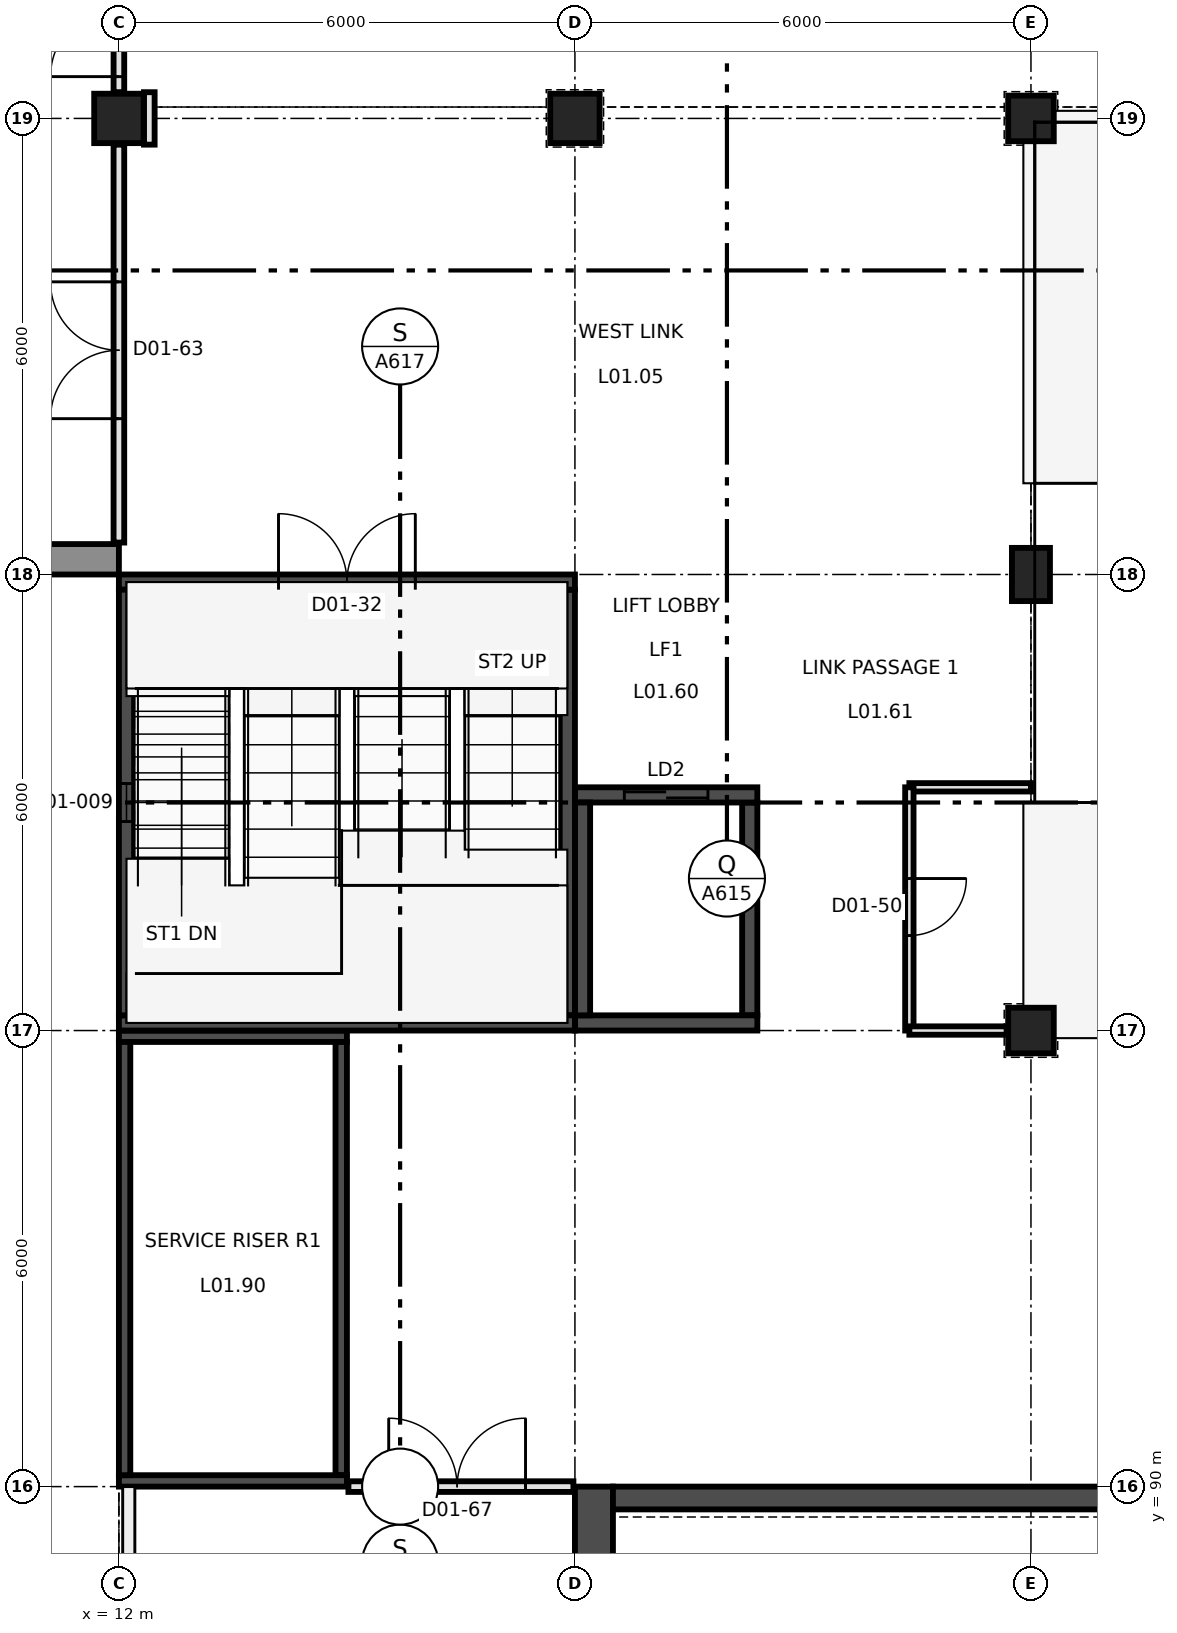
"""IFC4 building model, lengths in metres.
Left out: names, types, materials, properties, quantities, classifications, styles, units other than length and angle.
Written with IfcOpenShell. Run it as: python <this file> out.ifc"""

import sys

from ifc_helpers import new_model, si_unit, direction, frame, frame_2d, origin, origin_2d, place, context, subcontext, project, spatial, rectangle, extrude, element, fill, save


model = new_model("IFC4")
c1 = context("Model", 3, precision=1e-05, world=origin(), true_north=direction((0.0, 1.0)))
c2 = subcontext(c1, "Body", "Model", "MODEL_VIEW")
j1 = project(units=[si_unit("LENGTHUNIT", "METRE"), si_unit("PLANEANGLEUNIT", "RADIAN")], contexts=[c1])
p1 = place(None, origin())
s1 = spatial("IfcSite", under=j1, at=p1, CompositionType="ELEMENT")
p2 = place(p1, origin())
s2 = spatial("IfcBuilding", under=s1, at=p2, CompositionType="ELEMENT")
p3 = place(p2, frame((0.0, 0.0, 7.0)))
s3 = spatial("IfcBuildingStorey", under=s2, at=p3, CompositionType="ELEMENT", Elevation=7.0)
p4 = place(p3, frame((24.0, 96.0, 0.0), z_axis=(0.0, 0.0, 1.0), x_axis=(1.0, 0.0, 0.0)))
e1 = element("IfcColumn", 1, at=p4, inside=s3, PredefinedType="COLUMN", context=c2, shape_type="SweptSolid", body=[
    extrude(rectangle(XDim=0.6, YDim=0.6, at=origin_2d()), origin(), (0.0, 0.0, 1.0), 5.0),
])
p5 = place(p3, frame((24.0, 102.0, 0.0), z_axis=(0.0, 0.0, 1.0), x_axis=(1.0, 0.0, 0.0)))
e2 = element("IfcColumn", 2, at=p5, inside=s3, PredefinedType="COLUMN", context=c2, shape_type="SweptSolid", body=[
    extrude(rectangle(XDim=0.5, YDim=0.7, at=origin_2d()), origin(), (0.0, 0.0, 1.0), 5.0),
])
for number, where, z_axis, x_axis in (
    (3, (12.0, 108.0, 0.0), (0.0, 0.0, 1.0), (1.0, 0.0, 0.0)),
    (4, (18.0, 108.0, 0.0), (0.0, 0.0, 1.0), (1.0, 0.0, 0.0)),
):
    element("IfcColumn", number, at=place(p3, frame(where, z_axis=z_axis, x_axis=x_axis)), inside=s3, PredefinedType="COLUMN", context=c2, shape_type="SweptSolid", body=[
        extrude(rectangle(XDim=0.65, YDim=0.65, at=origin_2d()), origin(), (0.0, 0.0, 1.0), 5.0),
    ])
p6 = place(p3, frame((24.0, 108.0, 0.0), z_axis=(0.0, 0.0, 1.0), x_axis=(1.0, 0.0, 0.0)))
e5 = element("IfcColumn", 5, at=p6, inside=s3, PredefinedType="COLUMN", context=c2, shape_type="SweptSolid", body=[
    extrude(rectangle(XDim=0.6, YDim=0.6, at=origin_2d()), origin(), (0.0, 0.0, 1.0), 5.0),
])
p7 = place(p3, frame((12.0, 101.9, 0.0), z_axis=(0.0, 0.0, 1.0), x_axis=(1.0, 0.0, 0.0)))
e6 = element("IfcWall", 6, at=p7, inside=s3, PredefinedType="SHEAR", context=c2, shape_type="SweptSolid", body=[
    extrude(rectangle(XDim=6.0, YDim=0.2, at=frame_2d((3.0, 0.0))), origin(), (0.0, 0.0, 1.0), 5.0),
])
p8 = place(p7, frame((2.1, 0.0, 0.0)))
e7 = element("IfcOpeningElement", 7, at=p8, cuts=e6, PredefinedType="OPENING", context=c2, shape_type="SweptSolid", body=[
    extrude(rectangle(XDim=1.8, YDim=2.2, at=frame_2d((0.9, 1.1))), frame((0.0, 0.11, 0.0), z_axis=(0.0, -1.0, 0.0), x_axis=(1.0, 0.0, 0.0)), (0.0, 0.0, 1.0), 0.22),
])
p9 = place(p3, frame((12.0, 96.1, 0.0), z_axis=(0.0, 0.0, 1.0), x_axis=(1.0, 0.0, 0.0)))
e8 = element("IfcWall", 8, at=p9, inside=s3, PredefinedType="SHEAR", context=c2, shape_type="SweptSolid", body=[
    extrude(rectangle(XDim=6.0, YDim=0.2, at=frame_2d((3.0, 0.0))), origin(), (0.0, 0.0, 1.0), 5.0),
])
p10 = place(p3, frame((12.1, 96.2, 0.0), z_axis=(0.0, 0.0, 1.0), x_axis=(0.0, 1.0, 0.0)))
e9 = element("IfcWall", 9, at=p10, inside=s3, PredefinedType="SHEAR", context=c2, shape_type="SweptSolid", body=[
    extrude(rectangle(XDim=5.6, YDim=0.2, at=frame_2d((2.8, 0.0))), origin(), (0.0, 0.0, 1.0), 5.0),
])
p11 = place(p10, frame((2.55, 0.0, 0.9)))
e10 = element("IfcOpeningElement", 10, at=p11, cuts=e9, PredefinedType="OPENING", context=c2, shape_type="SweptSolid", body=[
    extrude(rectangle(XDim=0.5, YDim=2.1, at=frame_2d((0.25, 1.05))), frame((0.0, 0.11, 0.0), z_axis=(0.0, -1.0, 0.0), x_axis=(1.0, 0.0, 0.0)), (0.0, 0.0, 1.0), 0.22),
])
p12 = place(p3, frame((17.9, 96.2, 0.0), z_axis=(0.0, 0.0, 1.0), x_axis=(0.0, 1.0, 0.0)))
e11 = element("IfcWall", 11, at=p12, inside=s3, PredefinedType="SHEAR", context=c2, shape_type="SweptSolid", body=[
    extrude(rectangle(XDim=5.6, YDim=0.2, at=frame_2d((2.8, 0.0))), origin(), (0.0, 0.0, 1.0), 5.0),
])
p13 = place(p3, frame((18.0, 99.1, 0.0), z_axis=(0.0, 0.0, 1.0), x_axis=(1.0, 0.0, 0.0)))
e12 = element("IfcWall", 12, at=p13, inside=s3, PredefinedType="SHEAR", context=c2, shape_type="SweptSolid", body=[
    extrude(rectangle(XDim=2.4, YDim=0.2, at=frame_2d((1.2, 0.0))), origin(), (0.0, 0.0, 1.0), 5.0),
])
p14 = place(p13, frame((0.65, 0.0, 0.0)))
e13 = element("IfcOpeningElement", 13, at=p14, cuts=e12, PredefinedType="OPENING", context=c2, shape_type="SweptSolid", body=[
    extrude(rectangle(XDim=1.1, YDim=2.1, at=frame_2d((0.55, 1.05))), frame((0.0, 0.11, 0.0), z_axis=(0.0, -1.0, 0.0), x_axis=(1.0, 0.0, 0.0)), (0.0, 0.0, 1.0), 0.22),
])
p15 = place(p3, frame((18.0, 96.1, 0.0), z_axis=(0.0, 0.0, 1.0), x_axis=(1.0, 0.0, 0.0)))
e14 = element("IfcWall", 14, at=p15, inside=s3, PredefinedType="SHEAR", context=c2, shape_type="SweptSolid", body=[
    extrude(rectangle(XDim=2.4, YDim=0.2, at=frame_2d((1.2, 0.0))), origin(), (0.0, 0.0, 1.0), 5.0),
])
for number, where, z_axis, x_axis in (
    (15, (18.1, 96.2, 0.0), (0.0, 0.0, 1.0), (0.0, 1.0, 0.0)),
    (16, (20.3, 96.2, 0.0), (0.0, 0.0, 1.0), (0.0, 1.0, 0.0)),
):
    element("IfcWall", number, at=place(p3, frame(where, z_axis=z_axis, x_axis=x_axis)), inside=s3, PredefinedType="SHEAR", context=c2, shape_type="SweptSolid", body=[
        extrude(rectangle(XDim=2.8, YDim=0.2, at=frame_2d((1.4, 0.0))), origin(), (0.0, 0.0, 1.0), 5.0),
    ])
for number, where, z_axis, x_axis in (
    (17, (12.0, 95.925, 0.0), (0.0, 0.0, 1.0), (1.0, 0.0, 0.0)),
    (18, (12.0, 90.075, 0.0), (0.0, 0.0, 1.0), (1.0, 0.0, 0.0)),
):
    element("IfcWall", number, at=place(p3, frame(where, z_axis=z_axis, x_axis=x_axis)), inside=s3, PredefinedType="SHEAR", context=c2, shape_type="SweptSolid", body=[
        extrude(rectangle(XDim=3.0, YDim=0.15, at=frame_2d((1.5, 0.0))), origin(), (0.0, 0.0, 1.0), 5.0),
    ])
for number, where, z_axis, x_axis in (
    (19, (12.075, 90.15, 0.0), (0.0, 0.0, 1.0), (0.0, 1.0, 0.0)),
    (20, (14.925, 90.15, 0.0), (0.0, 0.0, 1.0), (0.0, 1.0, 0.0)),
):
    element("IfcWall", number, at=place(p3, frame(where, z_axis=z_axis, x_axis=x_axis)), inside=s3, PredefinedType="SHEAR", context=c2, shape_type="SweptSolid", body=[
        extrude(rectangle(XDim=5.7, YDim=0.15, at=frame_2d((2.85, 0.0))), origin(), (0.0, 0.0, 1.0), 5.0),
    ])
p16 = place(p3, frame((18.25, 54.5, 0.0), z_axis=(0.0, 0.0, 1.0), x_axis=(0.0, 1.0, 0.0)))
e21 = element("IfcWall", 21, at=p16, inside=s3, PredefinedType="SHEAR", context=c2, shape_type="SweptSolid", body=[
    extrude(rectangle(XDim=35.5, YDim=0.5, at=frame_2d((17.75, 0.0))), origin(), (0.0, 0.0, 1.0), 5.0),
])
p17 = place(p16, frame((18.2, 0.0, 0.0)))
e22 = element("IfcOpeningElement", 22, at=p17, cuts=e21, PredefinedType="OPENING", context=c2, shape_type="SweptSolid", body=[
    extrude(rectangle(XDim=1.8, YDim=2.4, at=frame_2d((0.9, 1.2))), frame((0.0, 0.26, 0.0), z_axis=(0.0, -1.0, 0.0), x_axis=(1.0, 0.0, 0.0)), (0.0, 0.0, 1.0), 0.52),
])
p18 = place(p16, frame((21.0, 0.0, 0.0)))
e23 = element("IfcOpeningElement", 23, at=p18, cuts=e21, PredefinedType="OPENING", context=c2, shape_type="SweptSolid", body=[
    extrude(rectangle(XDim=1.8, YDim=2.4, at=frame_2d((0.9, 1.2))), frame((0.0, 0.26, 0.0), z_axis=(0.0, -1.0, 0.0), x_axis=(1.0, 0.0, 0.0)), (0.0, 0.0, 1.0), 0.52),
])
p19 = place(p3, frame((18.5, 89.85, 0.0), z_axis=(0.0, 0.0, 1.0), x_axis=(1.0, 0.0, 0.0)))
e24 = element("IfcWall", 24, at=p19, inside=s3, PredefinedType="SHEAR", context=c2, shape_type="SweptSolid", body=[
    extrude(rectangle(XDim=29.0, YDim=0.3, at=frame_2d((14.5, 0.0))), origin(), (0.0, 0.0, 1.0), 5.0),
])
p20 = place(p3, frame((12.0, 102.2, 0.0), z_axis=(0.0, 0.0, 1.0), x_axis=(-1.0, 0.0, 0.0)))
e25 = element("IfcWall", 25, at=p20, inside=s3, PredefinedType="SOLIDWALL", context=c2, shape_type="SweptSolid", body=[
    extrude(rectangle(XDim=5.65, YDim=0.4, at=frame_2d((2.825, 0.0))), origin(), (0.0, 0.0, 1.0), 4.05),
])
p21 = place(p20, frame((1.625, 0.0, 0.9)))
e26 = element("IfcOpeningElement", 26, at=p21, cuts=e25, PredefinedType="OPENING", context=c2, shape_type="SweptSolid", body=[
    extrude(rectangle(XDim=2.4, YDim=2.95, at=frame_2d((1.2, 1.475))), frame((0.0, 0.21, 0.0), z_axis=(0.0, -1.0, 0.0), x_axis=(1.0, 0.0, 0.0)), (0.0, 0.0, 1.0), 0.42),
])
p22 = place(p3, frame((22.4, 99.2, 0.0), z_axis=(0.0, 0.0, 1.0), x_axis=(1.0, 0.0, 0.0)))
e27 = element("IfcWall", 27, at=p22, inside=s3, PredefinedType="PARTITIONING", context=c2, shape_type="SweptSolid", body=[
    extrude(rectangle(XDim=1.6, YDim=0.11, at=frame_2d((0.8, 0.0))), origin(), (0.0, 0.0, 1.0), 4.1),
])
p23 = place(p3, frame((22.4, 96.0, 0.0), z_axis=(0.0, 0.0, 1.0), x_axis=(0.0, 1.0, 0.0)))
e28 = element("IfcWall", 28, at=p23, inside=s3, PredefinedType="PARTITIONING", context=c2, shape_type="SweptSolid", body=[
    extrude(rectangle(XDim=3.2, YDim=0.11, at=frame_2d((1.6, 0.0))), origin(), (0.0, 0.0, 1.0), 4.15),
])
p24 = place(p23, frame((1.25, 0.0, 0.0)))
e29 = element("IfcOpeningElement", 29, at=p24, cuts=e28, PredefinedType="OPENING", context=c2, shape_type="SweptSolid", body=[
    extrude(rectangle(XDim=0.75, YDim=2.04, at=frame_2d((0.375, 1.02))), frame((0.0, 0.065, 0.0), z_axis=(0.0, -1.0, 0.0), x_axis=(1.0, 0.0, 0.0)), (0.0, 0.0, 1.0), 0.13),
])
p25 = place(p3, frame((22.4, 96.0, 0.0), z_axis=(0.0, 0.0, 1.0), x_axis=(1.0, 0.0, 0.0)))
e30 = element("IfcWall", 30, at=p25, inside=s3, PredefinedType="PARTITIONING", context=c2, shape_type="SweptSolid", body=[
    extrude(rectangle(XDim=1.28, YDim=0.11, at=frame_2d((0.64, 0.0))), origin(), (0.0, 0.0, 1.0), 4.15),
])
p26 = place(p3, frame((12.0, 108.345, 0.0), z_axis=(0.0, 0.0, 1.0), x_axis=(0.0, 1.0, 0.0)))
e31 = element("IfcWall", 31, at=p26, inside=s3, PredefinedType="PARTITIONING", context=c2, shape_type="SweptSolid", body=[
    extrude(rectangle(XDim=5.31, YDim=0.14, at=frame_2d((2.655, 0.0))), origin(), (0.0, 0.0, 1.0), 4.05),
])
p27 = place(p26, frame((0.205, 0.0, 0.0)))
e32 = element("IfcOpeningElement", 32, at=p27, cuts=e31, PredefinedType="OPENING", context=c2, shape_type="SweptSolid", body=[
    extrude(rectangle(XDim=1.8, YDim=2.1, at=frame_2d((0.9, 1.05))), frame((0.0, 0.08, 0.0), z_axis=(0.0, -1.0, 0.0), x_axis=(1.0, 0.0, 0.0)), (0.0, 0.0, 1.0), 0.16),
])
p28 = place(p3, frame((12.0, 102.42, 0.0), z_axis=(0.0, 0.0, 1.0), x_axis=(0.0, 1.0, 0.0)))
e33 = element("IfcWall", 33, at=p28, inside=s3, PredefinedType="PARTITIONING", context=c2, shape_type="SweptSolid", body=[
    extrude(rectangle(XDim=5.235, YDim=0.14, at=frame_2d((2.618, 0.0))), origin(), (0.0, 0.0, 1.0), 4.15),
])
p29 = place(p28, frame((1.63, 0.0, 0.0)))
e34 = element("IfcOpeningElement", 34, at=p29, cuts=e33, PredefinedType="OPENING", context=c2, shape_type="SweptSolid", body=[
    extrude(rectangle(XDim=1.8, YDim=2.1, at=frame_2d((0.9, 1.05))), frame((0.0, 0.08, 0.0), z_axis=(0.0, -1.0, 0.0), x_axis=(1.0, 0.0, 0.0)), (0.0, 0.0, 1.0), 0.16),
])
p30 = place(p3, frame((12.4, 107.655, 0.0), z_axis=(0.0, 0.0, 1.0), x_axis=(0.0, 1.0, 0.0)))
e35 = element("IfcWall", 35, at=p30, inside=s3, PredefinedType="PARTITIONING", context=c2, shape_type="SweptSolid", body=[
    extrude(rectangle(XDim=0.69, YDim=0.14, at=frame_2d((0.345, 0.0))), origin(), (0.0, 0.0, 1.0), 4.05),
])
p31 = place(p3, frame((15.02, 90.0, 0.0), z_axis=(0.0, 0.0, 1.0), x_axis=(1.0, 0.0, 0.0)))
e36 = element("IfcWall", 36, at=p31, inside=s3, PredefinedType="PARTITIONING", context=c2, shape_type="SweptSolid", body=[
    extrude(rectangle(XDim=2.96, YDim=0.14, at=frame_2d((1.48, 0.0))), origin(), (0.0, 0.0, 1.0), 4.15),
])
p32 = place(p31, frame((0.53, 0.0, 0.0)))
e37 = element("IfcOpeningElement", 37, at=p32, cuts=e36, PredefinedType="OPENING", context=c2, shape_type="SweptSolid", body=[
    extrude(rectangle(XDim=1.8, YDim=2.1, at=frame_2d((0.9, 1.05))), frame((0.0, 0.08, 0.0), z_axis=(0.0, -1.0, 0.0), x_axis=(1.0, 0.0, 0.0)), (0.0, 0.0, 1.0), 0.16),
])
p33 = place(p11, origin())
e38 = element("IfcWindow", 38, at=p33, inside=s3, PartitioningType="SINGLE_PANEL", PredefinedType="WINDOW", context=c2, shape_type="SweptSolid", body=[
    extrude(rectangle(XDim=0.5, YDim=2.1, at=frame_2d((0.25, 1.05))), frame((0.0, 0.03, 0.0), z_axis=(0.0, -1.0, 0.0), x_axis=(1.0, 0.0, 0.0)), (0.0, 0.0, 1.0), 0.06),
])
fill(e10, e38)
p34 = place(p8, frame((1.8, 0.0, 0.0), z_axis=(0.0, 0.0, 1.0), x_axis=(-1.0, 0.0, 0.0)))
e39 = element("IfcDoor", 39, at=p34, inside=s3, OperationType="DOUBLE_DOOR_SINGLE_SWING", PredefinedType="DOOR", context=c2, shape_type="SweptSolid", body=[
    extrude(rectangle(XDim=1.8, YDim=2.2, at=frame_2d((0.9, 1.1))), frame((0.0, 0.025, 0.0), z_axis=(0.0, -1.0, 0.0), x_axis=(1.0, 0.0, 0.0)), (0.0, 0.0, 1.0), 0.05),
])
fill(e7, e39)
p35 = place(p24, frame((0.75, 0.0, 0.0), z_axis=(0.0, 0.0, 1.0), x_axis=(-1.0, 0.0, 0.0)))
e40 = element("IfcDoor", 40, at=p35, inside=s3, OperationType="SINGLE_SWING_RIGHT", PredefinedType="DOOR", context=c2, shape_type="SweptSolid", body=[
    extrude(rectangle(XDim=0.75, YDim=2.04, at=frame_2d((0.375, 1.02))), frame((0.0, 0.025, 0.0), z_axis=(0.0, -1.0, 0.0), x_axis=(1.0, 0.0, 0.0)), (0.0, 0.0, 1.0), 0.05),
])
fill(e29, e40)
p36 = place(p29, frame((1.8, 0.0, 0.0), z_axis=(0.0, 0.0, 1.0), x_axis=(-1.0, 0.0, 0.0)))
e41 = element("IfcDoor", 41, at=p36, inside=s3, OperationType="DOUBLE_DOOR_SINGLE_SWING", PredefinedType="DOOR", context=c2, shape_type="SweptSolid", body=[
    extrude(rectangle(XDim=1.8, YDim=2.1, at=frame_2d((0.9, 1.05))), frame((0.0, 0.025, 0.0), z_axis=(0.0, -1.0, 0.0), x_axis=(1.0, 0.0, 0.0)), (0.0, 0.0, 1.0), 0.05),
])
fill(e34, e41)
p37 = place(p27, frame((1.8, 0.0, 0.0), z_axis=(0.0, 0.0, 1.0), x_axis=(-1.0, 0.0, 0.0)))
e42 = element("IfcDoor", 42, at=p37, inside=s3, OperationType="DOUBLE_DOOR_SINGLE_SWING", PredefinedType="DOOR", context=c2, shape_type="SweptSolid", body=[
    extrude(rectangle(XDim=1.8, YDim=2.1, at=frame_2d((0.9, 1.05))), frame((0.0, 0.025, 0.0), z_axis=(0.0, -1.0, 0.0), x_axis=(1.0, 0.0, 0.0)), (0.0, 0.0, 1.0), 0.05),
])
fill(e32, e42)
p38 = place(p32, frame((1.8, 0.0, 0.0), z_axis=(0.0, 0.0, 1.0), x_axis=(-1.0, 0.0, 0.0)))
e43 = element("IfcDoor", 43, at=p38, inside=s3, OperationType="DOUBLE_DOOR_SINGLE_SWING", PredefinedType="DOOR", context=c2, shape_type="SweptSolid", body=[
    extrude(rectangle(XDim=1.8, YDim=2.1, at=frame_2d((0.9, 1.05))), frame((0.0, 0.025, 0.0), z_axis=(0.0, -1.0, 0.0), x_axis=(1.0, 0.0, 0.0)), (0.0, 0.0, 1.0), 0.05),
])
fill(e37, e43)
p39 = place(p14, origin())
e44 = element("IfcDoor", 44, at=p39, inside=s3, OperationType="DOUBLE_DOOR_SLIDING", PredefinedType="DOOR", context=c2, shape_type="SweptSolid", body=[
    extrude(rectangle(XDim=1.1, YDim=2.1, at=frame_2d((0.55, 1.05))), frame((0.0, 0.025, 0.0), z_axis=(0.0, -1.0, 0.0), x_axis=(1.0, 0.0, 0.0)), (0.0, 0.0, 1.0), 0.05),
])
fill(e13, e44)
save(model, sys.argv[1])
